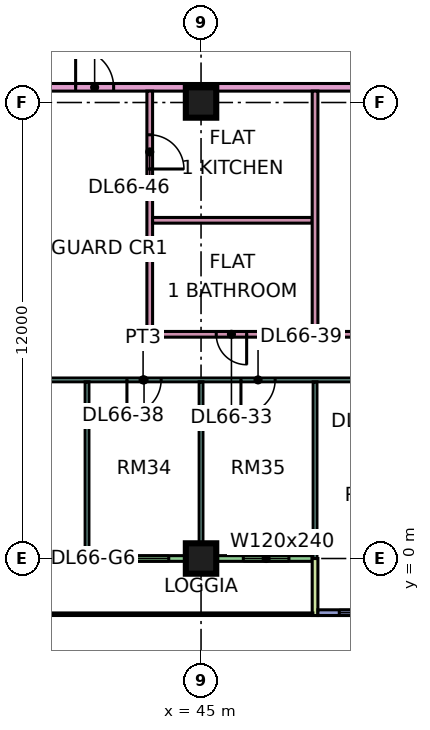
"""IFC4 building model, lengths in metres.
Left out: names, types, materials, properties, quantities, classifications, styles, units other than length and angle.
Written with IfcOpenShell. Run it as: python <this file> out.ifc"""

import sys

from ifc_helpers import new_model, si_unit, direction, frame, frame_2d, origin, origin_2d, place, context, subcontext, project, spatial, rectangle, extrude, element, fill, save


model = new_model("IFC4")
c1 = context("Model", 3, precision=1e-05, world=origin(), true_north=direction((0.0, 1.0)))
c2 = subcontext(c1, "Body", "Model", "MODEL_VIEW")
j1 = project(units=[si_unit("LENGTHUNIT", "METRE"), si_unit("PLANEANGLEUNIT", "RADIAN")], contexts=[c1])
p1 = place(None, origin())
s1 = spatial("IfcSite", under=j1, at=p1, CompositionType="ELEMENT")
p2 = place(p1, origin())
s2 = spatial("IfcBuilding", under=s1, at=p2, CompositionType="ELEMENT")
p3 = place(p2, frame((0.0, 0.0, 284.65)))
s3 = spatial("IfcBuildingStorey", under=s2, at=p3, CompositionType="ELEMENT", Elevation=284.65)
for number, where, z_axis, x_axis in (
    (1, (45.0, 0.0, 0.0), (0.0, 0.0, 1.0), (1.0, 0.0, 0.0)),
    (2, (45.0, 12.0, 0.0), (0.0, 0.0, 1.0), (1.0, 0.0, 0.0)),
):
    element("IfcColumn", number, at=place(p3, frame(where, z_axis=z_axis, x_axis=x_axis)), inside=s3, PredefinedType="COLUMN", context=c2, shape_type="SweptSolid", body=[
        extrude(rectangle(XDim=0.8, YDim=0.8, at=origin_2d()), origin(), (0.0, 0.0, 1.0), 3.75),
    ])
p4 = place(p3, frame((36.075, 0.0, 0.0), z_axis=(0.0, 0.0, 1.0), x_axis=(1.0, 0.0, 0.0)))
e3 = element("IfcWall", 3, at=p4, inside=s3, PredefinedType="SOLIDWALL", context=c2, shape_type="SweptSolid", body=[
    extrude(rectangle(XDim=11.85, YDim=0.15, at=frame_2d((5.925, 0.0))), origin(), (0.0, 0.0, 1.0), 3.35),
])
p5 = place(p4, frame((2.275, 0.0, 0.0)))
e4 = element("IfcOpeningElement", 4, at=p5, cuts=e3, PredefinedType="OPENING", context=c2, shape_type="SweptSolid", body=[
    extrude(rectangle(XDim=1.8, YDim=2.4, at=frame_2d((0.9, 1.2))), frame((0.0, 0.085, 0.0), z_axis=(0.0, -1.0, 0.0), x_axis=(1.0, 0.0, 0.0)), (0.0, 0.0, 1.0), 0.17),
])
p6 = place(p4, frame((6.275, 0.0, 0.45)))
e5 = element("IfcOpeningElement", 5, at=p6, cuts=e3, PredefinedType="OPENING", context=c2, shape_type="SweptSolid", body=[
    extrude(rectangle(XDim=1.8, YDim=2.4, at=frame_2d((0.9, 1.2))), frame((0.0, 0.085, 0.0), z_axis=(0.0, -1.0, 0.0), x_axis=(1.0, 0.0, 0.0)), (0.0, 0.0, 1.0), 0.17),
])
p7 = place(p4, frame((10.038, 0.0, 0.45)))
e6 = element("IfcOpeningElement", 6, at=p7, cuts=e3, PredefinedType="OPENING", context=c2, shape_type="SweptSolid", body=[
    extrude(rectangle(XDim=1.2, YDim=2.4, at=frame_2d((0.6, 1.2))), frame((0.0, 0.085, 0.0), z_axis=(0.0, -1.0, 0.0), x_axis=(1.0, 0.0, 0.0)), (0.0, 0.0, 1.0), 0.17),
])
p8 = place(p3, frame((48.0, -1.5, 0.0), z_axis=(0.0, 0.0, 1.0), x_axis=(0.0, 1.0, 0.0)))
e7 = element("IfcWall", 7, at=p8, inside=s3, PredefinedType="SOLIDWALL", context=c2, shape_type="SweptSolid", body=[
    extrude(rectangle(XDim=1.5, YDim=0.15, at=frame_2d((0.75, 0.0))), origin(), (0.0, 0.0, 1.0), 3.35),
])
p9 = place(p3, frame((48.075, -1.425, 0.0), z_axis=(0.0, 0.0, 1.0), x_axis=(1.0, 0.0, 0.0)))
e8 = element("IfcWall", 8, at=p9, inside=s3, PredefinedType="SOLIDWALL", context=c2, shape_type="SweptSolid", body=[
    extrude(rectangle(XDim=13.425, YDim=0.15, at=frame_2d((6.712, 0.0))), origin(), (0.0, 0.0, 1.0), 3.35),
])
p10 = place(p9, frame((0.562, 0.0, 0.45)))
e9 = element("IfcOpeningElement", 9, at=p10, cuts=e8, PredefinedType="OPENING", context=c2, shape_type="SweptSolid", body=[
    extrude(rectangle(XDim=1.8, YDim=2.4, at=frame_2d((0.9, 1.2))), frame((0.0, 0.085, 0.0), z_axis=(0.0, -1.0, 0.0), x_axis=(1.0, 0.0, 0.0)), (0.0, 0.0, 1.0), 0.17),
])
p11 = place(p9, frame((3.525, 0.0, 0.45)))
e10 = element("IfcOpeningElement", 10, at=p11, cuts=e8, PredefinedType="OPENING", context=c2, shape_type="SweptSolid", body=[
    extrude(rectangle(XDim=1.8, YDim=2.4, at=frame_2d((0.9, 1.2))), frame((0.0, 0.085, 0.0), z_axis=(0.0, -1.0, 0.0), x_axis=(1.0, 0.0, 0.0)), (0.0, 0.0, 1.0), 0.17),
])
p12 = place(p9, frame((6.525, 0.0, 0.45)))
e11 = element("IfcOpeningElement", 11, at=p12, cuts=e8, PredefinedType="OPENING", context=c2, shape_type="SweptSolid", body=[
    extrude(rectangle(XDim=1.8, YDim=2.4, at=frame_2d((0.9, 1.2))), frame((0.0, 0.085, 0.0), z_axis=(0.0, -1.0, 0.0), x_axis=(1.0, 0.0, 0.0)), (0.0, 0.0, 1.0), 0.17),
])
p13 = place(p9, frame((9.375, 0.0, 0.45)))
e12 = element("IfcOpeningElement", 12, at=p13, cuts=e8, PredefinedType="OPENING", context=c2, shape_type="SweptSolid", body=[
    extrude(rectangle(XDim=3.6, YDim=2.4, at=frame_2d((1.8, 1.2))), frame((0.0, 0.085, 0.0), z_axis=(0.0, -1.0, 0.0), x_axis=(1.0, 0.0, 0.0)), (0.0, 0.0, 1.0), 0.17),
])
p14 = place(p3, frame((33.05, 4.7, 0.0), z_axis=(0.0, 0.0, 1.0), x_axis=(1.0, 0.0, 0.0)))
e13 = element("IfcWall", 13, at=p14, inside=s3, PredefinedType="PARTITIONING", context=c2, shape_type="SweptSolid", body=[
    extrude(rectangle(XDim=20.85, YDim=0.1, at=frame_2d((10.425, 0.0))), origin(), (0.0, 0.0, 1.0), 3.35),
])
p15 = place(p14, frame((10.0, 0.0, 0.0)))
e14 = element("IfcOpeningElement", 14, at=p15, cuts=e13, PredefinedType="OPENING", context=c2, shape_type="SweptSolid", body=[
    extrude(rectangle(XDim=0.9, YDim=2.1, at=frame_2d((0.45, 1.05))), frame((0.0, 0.06, 0.0), z_axis=(0.0, -1.0, 0.0), x_axis=(1.0, 0.0, 0.0)), (0.0, 0.0, 1.0), 0.12),
])
p16 = place(p14, frame((13.0, 0.0, 0.0)))
e15 = element("IfcOpeningElement", 15, at=p16, cuts=e13, PredefinedType="OPENING", context=c2, shape_type="SweptSolid", body=[
    extrude(rectangle(XDim=0.9, YDim=2.1, at=frame_2d((0.45, 1.05))), frame((0.0, 0.06, 0.0), z_axis=(0.0, -1.0, 0.0), x_axis=(1.0, 0.0, 0.0)), (0.0, 0.0, 1.0), 0.12),
])
p17 = place(p14, frame((16.0, 0.0, 0.0)))
e16 = element("IfcOpeningElement", 16, at=p17, cuts=e13, PredefinedType="OPENING", context=c2, shape_type="SweptSolid", body=[
    extrude(rectangle(XDim=0.9, YDim=2.1, at=frame_2d((0.45, 1.05))), frame((0.0, 0.06, 0.0), z_axis=(0.0, -1.0, 0.0), x_axis=(1.0, 0.0, 0.0)), (0.0, 0.0, 1.0), 0.12),
])
p18 = place(p14, frame((19.0, 0.0, 0.0)))
e17 = element("IfcOpeningElement", 17, at=p18, cuts=e13, PredefinedType="OPENING", context=c2, shape_type="SweptSolid", body=[
    extrude(rectangle(XDim=0.9, YDim=2.1, at=frame_2d((0.45, 1.05))), frame((0.0, 0.06, 0.0), z_axis=(0.0, -1.0, 0.0), x_axis=(1.0, 0.0, 0.0)), (0.0, 0.0, 1.0), 0.12),
])
p19 = place(p14, frame((4.0, 0.0, 0.0)))
e18 = element("IfcOpeningElement", 18, at=p19, cuts=e13, PredefinedType="OPENING", context=c2, shape_type="SweptSolid", body=[
    extrude(rectangle(XDim=0.9, YDim=2.1, at=frame_2d((0.45, 1.05))), frame((0.0, 0.06, 0.0), z_axis=(0.0, -1.0, 0.0), x_axis=(1.0, 0.0, 0.0)), (0.0, 0.0, 1.0), 0.12),
])
p20 = place(p3, frame((40.65, 12.4, 0.0), z_axis=(0.0, 0.0, 1.0), x_axis=(1.0, 0.0, 0.0)))
e19 = element("IfcWall", 19, at=p20, inside=s3, PredefinedType="PARTITIONING", context=c2, shape_type="SweptSolid", body=[
    extrude(rectangle(XDim=22.276, YDim=0.2, at=frame_2d((11.138, 0.0))), origin(), (0.0, 0.0, 1.0), 3.35),
])
p21 = place(p20, frame((14.7, 0.0, 0.0)))
e20 = element("IfcOpeningElement", 20, at=p21, cuts=e19, PredefinedType="OPENING", context=c2, shape_type="SweptSolid", body=[
    extrude(rectangle(XDim=1.0, YDim=2.1, at=frame_2d((0.5, 1.05))), frame((0.0, 0.11, 0.0), z_axis=(0.0, -1.0, 0.0), x_axis=(1.0, 0.0, 0.0)), (0.0, 0.0, 1.0), 0.22),
])
p22 = place(p20, frame((1.05, 0.0, 0.0)))
e21 = element("IfcOpeningElement", 21, at=p22, cuts=e19, PredefinedType="OPENING", context=c2, shape_type="SweptSolid", body=[
    extrude(rectangle(XDim=1.0, YDim=2.1, at=frame_2d((0.5, 1.05))), frame((0.0, 0.11, 0.0), z_axis=(0.0, -1.0, 0.0), x_axis=(1.0, 0.0, 0.0)), (0.0, 0.0, 1.0), 0.22),
])
p23 = place(p3, frame((42.0, 0.074, 0.0), z_axis=(0.0, 0.0, 1.0), x_axis=(0.0, 1.0, 0.0)))
e22 = element("IfcWall", 22, at=p23, inside=s3, PredefinedType="PARTITIONING", context=c2, shape_type="SweptSolid", body=[
    extrude(rectangle(XDim=4.576, YDim=0.1, at=frame_2d((2.288, 0.0))), origin(), (0.0, 0.0, 1.0), 3.35),
])
p24 = place(p3, frame((43.575, 5.9, 0.0), z_axis=(0.0, 0.0, 1.0), x_axis=(1.0, 0.0, 0.0)))
e23 = element("IfcWall", 23, at=p24, inside=s3, PredefinedType="PARTITIONING", context=c2, shape_type="SweptSolid", body=[
    extrude(rectangle(XDim=10.325, YDim=0.15, at=frame_2d((5.163, 0.0))), origin(), (0.0, 0.0, 1.0), 3.35),
])
p25 = place(p24, frame((1.825, 0.0, 0.0)))
e24 = element("IfcOpeningElement", 24, at=p25, cuts=e23, PredefinedType="OPENING", context=c2, shape_type="SweptSolid", body=[
    extrude(rectangle(XDim=0.8, YDim=2.1, at=frame_2d((0.4, 1.05))), frame((0.0, 0.085, 0.0), z_axis=(0.0, -1.0, 0.0), x_axis=(1.0, 0.0, 0.0)), (0.0, 0.0, 1.0), 0.17),
])
p26 = place(p24, frame((6.975, 0.0, 0.0)))
e25 = element("IfcOpeningElement", 25, at=p26, cuts=e23, PredefinedType="OPENING", context=c2, shape_type="SweptSolid", body=[
    extrude(rectangle(XDim=0.9, YDim=2.1, at=frame_2d((0.45, 1.05))), frame((0.0, 0.085, 0.0), z_axis=(0.0, -1.0, 0.0), x_axis=(1.0, 0.0, 0.0)), (0.0, 0.0, 1.0), 0.17),
])
p27 = place(p3, frame((43.65, 5.975, 0.0), z_axis=(0.0, 0.0, 1.0), x_axis=(0.0, 1.0, 0.0)))
e26 = element("IfcWall", 26, at=p27, inside=s3, PredefinedType="PARTITIONING", context=c2, shape_type="SweptSolid", body=[
    extrude(rectangle(XDim=6.325, YDim=0.15, at=frame_2d((3.163, 0.0))), origin(), (0.0, 0.0, 1.0), 3.35),
])
p28 = place(p27, frame((4.275, 0.0, 0.0)))
e27 = element("IfcOpeningElement", 27, at=p28, cuts=e26, PredefinedType="OPENING", context=c2, shape_type="SweptSolid", body=[
    extrude(rectangle(XDim=0.9, YDim=2.1, at=frame_2d((0.45, 1.05))), frame((0.0, 0.085, 0.0), z_axis=(0.0, -1.0, 0.0), x_axis=(1.0, 0.0, 0.0)), (0.0, 0.0, 1.0), 0.17),
])
p29 = place(p3, frame((43.725, 8.9, 0.0), z_axis=(0.0, 0.0, 1.0), x_axis=(1.0, 0.0, 0.0)))
e28 = element("IfcWall", 28, at=p29, inside=s3, PredefinedType="PARTITIONING", context=c2, shape_type="SweptSolid", body=[
    extrude(rectangle(XDim=4.2, YDim=0.15, at=frame_2d((2.1, 0.0))), origin(), (0.0, 0.0, 1.0), 3.35),
])
p30 = place(p3, frame((45.0, 0.074, 0.0), z_axis=(0.0, 0.0, 1.0), x_axis=(0.0, 1.0, 0.0)))
e29 = element("IfcWall", 29, at=p30, inside=s3, PredefinedType="PARTITIONING", context=c2, shape_type="SweptSolid", body=[
    extrude(rectangle(XDim=4.576, YDim=0.1, at=frame_2d((2.288, 0.0))), origin(), (0.0, 0.0, 1.0), 3.35),
])
p31 = place(p3, frame((48.0, 0.0, 0.0), z_axis=(0.0, 0.0, 1.0), x_axis=(0.0, 1.0, 0.0)))
e30 = element("IfcWall", 30, at=p31, inside=s3, PredefinedType="PARTITIONING", context=c2, shape_type="SweptSolid", body=[
    extrude(rectangle(XDim=4.65, YDim=0.1, at=frame_2d((2.325, 0.0))), origin(), (0.0, 0.0, 1.0), 3.35),
])
p32 = place(p3, frame((48.0, 5.975, 0.0), z_axis=(0.0, 0.0, 1.0), x_axis=(0.0, 1.0, 0.0)))
e31 = element("IfcWall", 31, at=p32, inside=s3, PredefinedType="PARTITIONING", context=c2, shape_type="SweptSolid", body=[
    extrude(rectangle(XDim=6.325, YDim=0.15, at=frame_2d((3.163, 0.0))), origin(), (0.0, 0.0, 1.0), 3.35),
])
p33 = place(p6, origin())
e32 = element("IfcWindow", 32, at=p33, inside=s3, PartitioningType="SINGLE_PANEL", PredefinedType="WINDOW", context=c2, shape_type="SweptSolid", body=[
    extrude(rectangle(XDim=1.8, YDim=2.4, at=frame_2d((0.9, 1.2))), frame((0.0, 0.03, 0.0), z_axis=(0.0, -1.0, 0.0), x_axis=(1.0, 0.0, 0.0)), (0.0, 0.0, 1.0), 0.06),
])
fill(e5, e32)
p34 = place(p7, origin())
e33 = element("IfcWindow", 33, at=p34, inside=s3, PartitioningType="SINGLE_PANEL", PredefinedType="WINDOW", context=c2, shape_type="SweptSolid", body=[
    extrude(rectangle(XDim=1.2, YDim=2.4, at=frame_2d((0.6, 1.2))), frame((0.0, 0.03, 0.0), z_axis=(0.0, -1.0, 0.0), x_axis=(1.0, 0.0, 0.0)), (0.0, 0.0, 1.0), 0.06),
])
fill(e6, e33)
p35 = place(p10, origin())
e34 = element("IfcWindow", 34, at=p35, inside=s3, PartitioningType="SINGLE_PANEL", PredefinedType="WINDOW", context=c2, shape_type="SweptSolid", body=[
    extrude(rectangle(XDim=1.8, YDim=2.4, at=frame_2d((0.9, 1.2))), frame((0.0, 0.03, 0.0), z_axis=(0.0, -1.0, 0.0), x_axis=(1.0, 0.0, 0.0)), (0.0, 0.0, 1.0), 0.06),
])
fill(e9, e34)
p36 = place(p25, origin())
e35 = element("IfcDoor", 35, at=p36, inside=s3, OperationType="SINGLE_SWING_RIGHT", PredefinedType="DOOR", context=c2, shape_type="SweptSolid", body=[
    extrude(rectangle(XDim=0.8, YDim=2.1, at=frame_2d((0.4, 1.05))), frame((0.0, 0.025, 0.0), z_axis=(0.0, -1.0, 0.0), x_axis=(1.0, 0.0, 0.0)), (0.0, 0.0, 1.0), 0.05),
])
fill(e24, e35)
p37 = place(p15, frame((0.9, 0.0, 0.0), z_axis=(0.0, 0.0, 1.0), x_axis=(-1.0, 0.0, 0.0)))
e36 = element("IfcDoor", 36, at=p37, inside=s3, OperationType="SINGLE_SWING_LEFT", PredefinedType="DOOR", context=c2, shape_type="SweptSolid", body=[
    extrude(rectangle(XDim=0.9, YDim=2.1, at=frame_2d((0.45, 1.05))), frame((0.0, 0.025, 0.0), z_axis=(0.0, -1.0, 0.0), x_axis=(1.0, 0.0, 0.0)), (0.0, 0.0, 1.0), 0.05),
])
fill(e14, e36)
p38 = place(p16, frame((0.9, 0.0, 0.0), z_axis=(0.0, 0.0, 1.0), x_axis=(-1.0, 0.0, 0.0)))
e37 = element("IfcDoor", 37, at=p38, inside=s3, OperationType="SINGLE_SWING_LEFT", PredefinedType="DOOR", context=c2, shape_type="SweptSolid", body=[
    extrude(rectangle(XDim=0.9, YDim=2.1, at=frame_2d((0.45, 1.05))), frame((0.0, 0.025, 0.0), z_axis=(0.0, -1.0, 0.0), x_axis=(1.0, 0.0, 0.0)), (0.0, 0.0, 1.0), 0.05),
])
fill(e15, e37)
p39 = place(p22, origin())
e38 = element("IfcDoor", 38, at=p39, inside=s3, OperationType="SINGLE_SWING_LEFT", PredefinedType="DOOR", context=c2, shape_type="SweptSolid", body=[
    extrude(rectangle(XDim=1.0, YDim=2.1, at=frame_2d((0.5, 1.05))), frame((0.0, 0.025, 0.0), z_axis=(0.0, -1.0, 0.0), x_axis=(1.0, 0.0, 0.0)), (0.0, 0.0, 1.0), 0.05),
])
fill(e21, e38)
p40 = place(p28, frame((0.9, 0.0, 0.0), z_axis=(0.0, 0.0, 1.0), x_axis=(-1.0, 0.0, 0.0)))
e39 = element("IfcDoor", 39, at=p40, inside=s3, OperationType="SINGLE_SWING_LEFT", PredefinedType="DOOR", context=c2, shape_type="SweptSolid", body=[
    extrude(rectangle(XDim=0.9, YDim=2.1, at=frame_2d((0.45, 1.05))), frame((0.0, 0.025, 0.0), z_axis=(0.0, -1.0, 0.0), x_axis=(1.0, 0.0, 0.0)), (0.0, 0.0, 1.0), 0.05),
])
fill(e27, e39)
save(model, sys.argv[1])
